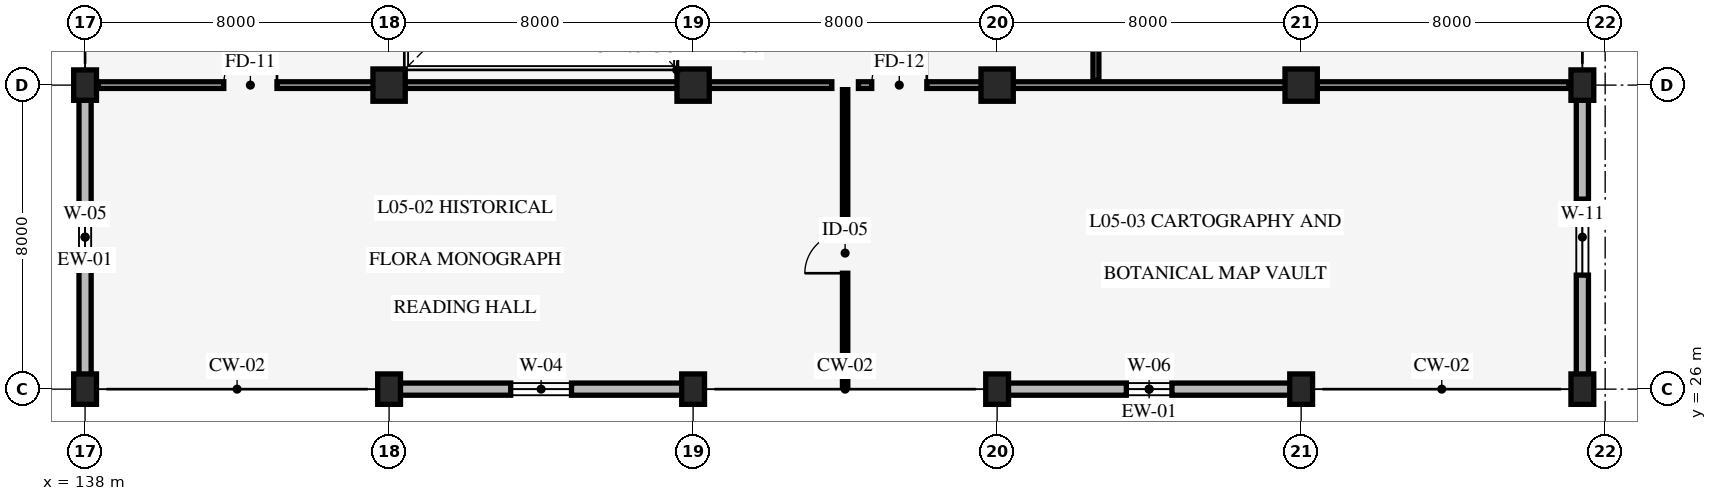
"""IFC4 building model, lengths in metres.
Left out: names, types, materials, properties, quantities, classifications, styles, units other than length and angle.
Written with IfcOpenShell. Run it as: python <this file> out.ifc"""

import sys

from ifc_helpers import new_model, si_unit, direction, frame, frame_2d, origin, origin_2d, place, context, subcontext, project, spatial, rectangle, extrude, element, fill, save


model = new_model("IFC4")
c1 = context("Model", 3, precision=1e-05, world=origin(), true_north=direction((0.0, 1.0)))
c2 = subcontext(c1, "Body", "Model", "MODEL_VIEW")
j1 = project(units=[si_unit("LENGTHUNIT", "METRE"), si_unit("PLANEANGLEUNIT", "RADIAN")], contexts=[c1])
p1 = place(None, origin())
s1 = spatial("IfcSite", under=j1, at=p1, CompositionType="ELEMENT")
p2 = place(p1, origin())
s2 = spatial("IfcBuilding", under=s1, at=p2, CompositionType="ELEMENT")
p3 = place(p2, frame((0.0, 0.0, 19.2)))
s3 = spatial("IfcBuildingStorey", under=s2, at=p3, CompositionType="ELEMENT", Elevation=19.2)
for number, where, z_axis, x_axis in (
    (1, (138.0, 26.0, 0.0), (0.0, 0.0, 1.0), (1.0, 0.0, 0.0)),
    (2, (138.0, 34.0, 0.0), (0.0, 0.0, 1.0), (1.0, 0.0, 0.0)),
    (3, (146.0, 26.0, 0.0), (0.0, 0.0, 1.0), (1.0, 0.0, 0.0)),
):
    element("IfcColumn", number, at=place(p3, frame(where, z_axis=z_axis, x_axis=x_axis)), inside=s3, PredefinedType="COLUMN", context=c2, shape_type="SweptSolid", body=[
        extrude(rectangle(XDim=0.6, YDim=0.8, at=origin_2d()), origin(), (0.0, 0.0, 1.0), 4.2),
    ])
p4 = place(p3, frame((146.0, 34.0, 0.0), z_axis=(0.0, 0.0, 1.0), x_axis=(1.0, 0.0, 0.0)))
e4 = element("IfcColumn", 4, at=p4, inside=s3, PredefinedType="COLUMN", context=c2, shape_type="SweptSolid", body=[
    extrude(rectangle(XDim=0.85, YDim=0.85, at=origin_2d()), origin(), (0.0, 0.0, 1.0), 4.2),
])
p5 = place(p3, frame((154.0, 26.0, 0.0), z_axis=(0.0, 0.0, 1.0), x_axis=(1.0, 0.0, 0.0)))
e5 = element("IfcColumn", 5, at=p5, inside=s3, PredefinedType="COLUMN", context=c2, shape_type="SweptSolid", body=[
    extrude(rectangle(XDim=0.6, YDim=0.8, at=origin_2d()), origin(), (0.0, 0.0, 1.0), 4.2),
])
p6 = place(p3, frame((154.0, 34.0, 0.0), z_axis=(0.0, 0.0, 1.0), x_axis=(1.0, 0.0, 0.0)))
e6 = element("IfcColumn", 6, at=p6, inside=s3, PredefinedType="COLUMN", context=c2, shape_type="SweptSolid", body=[
    extrude(rectangle(XDim=0.85, YDim=0.85, at=origin_2d()), origin(), (0.0, 0.0, 1.0), 4.2),
])
p7 = place(p3, frame((162.0, 26.0, 0.0), z_axis=(0.0, 0.0, 1.0), x_axis=(1.0, 0.0, 0.0)))
e7 = element("IfcColumn", 7, at=p7, inside=s3, PredefinedType="COLUMN", context=c2, shape_type="SweptSolid", body=[
    extrude(rectangle(XDim=0.6, YDim=0.8, at=origin_2d()), origin(), (0.0, 0.0, 1.0), 4.2),
])
p8 = place(p3, frame((162.0, 34.0, 0.0), z_axis=(0.0, 0.0, 1.0), x_axis=(1.0, 0.0, 0.0)))
e8 = element("IfcColumn", 8, at=p8, inside=s3, PredefinedType="COLUMN", context=c2, shape_type="SweptSolid", body=[
    extrude(rectangle(XDim=0.85, YDim=0.85, at=origin_2d()), origin(), (0.0, 0.0, 1.0), 4.2),
])
p9 = place(p3, frame((170.0, 26.0, 0.0), z_axis=(0.0, 0.0, 1.0), x_axis=(1.0, 0.0, 0.0)))
e9 = element("IfcColumn", 9, at=p9, inside=s3, PredefinedType="COLUMN", context=c2, shape_type="SweptSolid", body=[
    extrude(rectangle(XDim=0.6, YDim=0.8, at=origin_2d()), origin(), (0.0, 0.0, 1.0), 4.2),
])
p10 = place(p3, frame((170.0, 34.0, 0.0), z_axis=(0.0, 0.0, 1.0), x_axis=(1.0, 0.0, 0.0)))
e10 = element("IfcColumn", 10, at=p10, inside=s3, PredefinedType="COLUMN", context=c2, shape_type="SweptSolid", body=[
    extrude(rectangle(XDim=0.85, YDim=0.85, at=origin_2d()), origin(), (0.0, 0.0, 1.0), 4.2),
])
for number, where, z_axis, x_axis in (
    (11, (177.4, 26.0, 0.0), (0.0, 0.0, 1.0), (1.0, 0.0, 0.0)),
    (12, (177.4, 34.0, 0.0), (0.0, 0.0, 1.0), (1.0, 0.0, 0.0)),
):
    element("IfcColumn", number, at=place(p3, frame(where, z_axis=z_axis, x_axis=x_axis)), inside=s3, PredefinedType="COLUMN", context=c2, shape_type="SweptSolid", body=[
        extrude(rectangle(XDim=0.6, YDim=0.8, at=origin_2d()), origin(), (0.0, 0.0, 1.0), 4.2),
    ])
p11 = place(p3, frame((170.0, 26.0, 0.0), z_axis=(0.0, 0.0, 1.0), x_axis=(-1.0, 0.0, 0.0)))
e13 = element("IfcWall", 13, at=p11, inside=s3, PredefinedType="STANDARD", context=c2, shape_type="SweptSolid", body=[
    extrude(rectangle(XDim=8.0, YDim=0.32, at=frame_2d((4.0, 0.0))), origin(), (0.0, 0.0, 1.0), 3.14),
])
p12 = place(p11, frame((3.4, 0.0, 0.85)))
e14 = element("IfcOpeningElement", 14, at=p12, cuts=e13, PredefinedType="OPENING", context=c2, shape_type="SweptSolid", body=[
    extrude(rectangle(XDim=1.2, YDim=1.2, at=frame_2d((0.6, 0.6))), frame((0.0, 0.17, 0.0), z_axis=(0.0, -1.0, 0.0), x_axis=(1.0, 0.0, 0.0)), (0.0, 0.0, 1.0), 0.34),
])
p13 = place(p3, frame((154.0, 26.0, 0.0), z_axis=(0.0, 0.0, 1.0), x_axis=(-1.0, 0.0, 0.0)))
e15 = element("IfcWall", 15, at=p13, inside=s3, PredefinedType="STANDARD", context=c2, shape_type="SweptSolid", body=[
    extrude(rectangle(XDim=8.0, YDim=0.32, at=frame_2d((4.0, 0.0))), origin(), (0.0, 0.0, 1.0), 3.14),
])
p14 = place(p13, frame((3.2, 0.0, 0.85)))
e16 = element("IfcOpeningElement", 16, at=p14, cuts=e15, PredefinedType="OPENING", context=c2, shape_type="SweptSolid", body=[
    extrude(rectangle(XDim=1.6, YDim=1.2, at=frame_2d((0.8, 0.6))), frame((0.0, 0.17, 0.0), z_axis=(0.0, -1.0, 0.0), x_axis=(1.0, 0.0, 0.0)), (0.0, 0.0, 1.0), 0.34),
])
p15 = place(p3, frame((138.0, 26.0, 0.0), z_axis=(0.0, 0.0, 1.0), x_axis=(0.0, 1.0, 0.0)))
e17 = element("IfcWall", 17, at=p15, inside=s3, PredefinedType="STANDARD", context=c2, shape_type="SweptSolid", body=[
    extrude(rectangle(XDim=8.0, YDim=0.32, at=frame_2d((4.0, 0.0))), origin(), (0.0, 0.0, 1.0), 3.19),
])
p16 = place(p15, frame((3.25, 0.0, 0.85)))
e18 = element("IfcOpeningElement", 18, at=p16, cuts=e17, PredefinedType="OPENING", context=c2, shape_type="SweptSolid", body=[
    extrude(rectangle(XDim=1.5, YDim=1.5, at=frame_2d((0.75, 0.75))), frame((0.0, 0.17, 0.0), z_axis=(0.0, -1.0, 0.0), x_axis=(1.0, 0.0, 0.0)), (0.0, 0.0, 1.0), 0.34),
])
p17 = place(p3, frame((177.4, 34.0, 0.0), z_axis=(0.0, 0.0, 1.0), x_axis=(0.0, -1.0, 0.0)))
e19 = element("IfcWall", 19, at=p17, inside=s3, PredefinedType="STANDARD", context=c2, shape_type="SweptSolid", body=[
    extrude(rectangle(XDim=8.0, YDim=0.32, at=frame_2d((4.0, 0.0))), origin(), (0.0, 0.0, 1.0), 3.19),
])
p18 = place(p17, frame((3.0, 0.0, 0.85)))
e20 = element("IfcOpeningElement", 20, at=p18, cuts=e19, PredefinedType="OPENING", context=c2, shape_type="SweptSolid", body=[
    extrude(rectangle(XDim=2.0, YDim=1.5, at=frame_2d((1.0, 0.75))), frame((0.0, 0.17, 0.0), z_axis=(0.0, -1.0, 0.0), x_axis=(1.0, 0.0, 0.0)), (0.0, 0.0, 1.0), 0.34),
])
p19 = place(p3, frame((164.6, 34.12, 0.0), z_axis=(0.0, 0.0, 1.0), x_axis=(0.0, 1.0, 0.0)))
e21 = element("IfcWall", 21, at=p19, inside=s3, PredefinedType="STANDARD", context=c2, shape_type="SweptSolid", body=[
    extrude(rectangle(XDim=15.8, YDim=0.155, at=frame_2d((7.9, 0.0))), origin(), (0.0, 0.0, 1.0), 3.9),
])
p20 = place(p19, frame((7.175, 0.0, 0.0)))
e22 = element("IfcOpeningElement", 22, at=p20, cuts=e21, PredefinedType="OPENING", context=c2, shape_type="SweptSolid", body=[
    extrude(rectangle(XDim=1.45, YDim=2.2, at=frame_2d((0.725, 1.1))), frame((0.0, 0.087, 0.0), z_axis=(0.0, -1.0, 0.0), x_axis=(1.0, 0.0, 0.0)), (0.0, 0.0, 1.0), 0.175),
])
p21 = place(p3, frame((138.35, 34.0, 0.0), z_axis=(0.0, 0.0, 1.0), x_axis=(1.0, 0.0, 0.0)))
e23 = element("IfcWall", 23, at=p21, inside=s3, PredefinedType="STANDARD", context=c2, shape_type="SweptSolid", body=[
    extrude(rectangle(XDim=19.3, YDim=0.175, at=frame_2d((9.65, 0.0))), origin(), (0.0, 0.0, 1.0), 3.14),
])
p22 = place(p21, frame((3.3, 0.0, 0.0)))
e24 = element("IfcOpeningElement", 24, at=p22, cuts=e23, PredefinedType="OPENING", context=c2, shape_type="SweptSolid", body=[
    extrude(rectangle(XDim=1.4, YDim=2.2, at=frame_2d((0.7, 1.1))), frame((0.0, 0.098, 0.0), z_axis=(0.0, -1.0, 0.0), x_axis=(1.0, 0.0, 0.0)), (0.0, 0.0, 1.0), 0.195),
])
p23 = place(p3, frame((158.0, 26.05, 0.0), z_axis=(0.0, 0.0, 1.0), x_axis=(0.0, 1.0, 0.0)))
e25 = element("IfcWall", 25, at=p23, inside=s3, PredefinedType="STANDARD", context=c2, shape_type="SweptSolid", body=[
    extrude(rectangle(XDim=7.83, YDim=0.14, at=frame_2d((3.915, 0.0))), origin(), (0.0, 0.0, 1.0), 3.39),
])
p24 = place(p23, frame((3.0, 0.0, 0.0)))
e26 = element("IfcOpeningElement", 26, at=p24, cuts=e25, PredefinedType="OPENING", context=c2, shape_type="SweptSolid", body=[
    extrude(rectangle(XDim=1.06, YDim=2.12, at=frame_2d((0.53, 1.06))), frame((0.0, 0.08, 0.0), z_axis=(0.0, -1.0, 0.0), x_axis=(1.0, 0.0, 0.0)), (0.0, 0.0, 1.0), 0.16),
])
p25 = place(p3, frame((158.35, 34.0, 0.0), z_axis=(0.0, 0.0, 1.0), x_axis=(1.0, 0.0, 0.0)))
e27 = element("IfcWall", 27, at=p25, inside=s3, PredefinedType="STANDARD", context=c2, shape_type="SweptSolid", body=[
    extrude(rectangle(XDim=18.7, YDim=0.175, at=frame_2d((9.35, 0.0))), origin(), (0.0, 0.0, 1.0), 3.14),
])
p26 = place(p25, frame((0.35, 0.0, 0.0)))
e28 = element("IfcOpeningElement", 28, at=p26, cuts=e27, PredefinedType="OPENING", context=c2, shape_type="SweptSolid", body=[
    extrude(rectangle(XDim=1.45, YDim=2.2, at=frame_2d((0.725, 1.1))), frame((0.0, 0.098, 0.0), z_axis=(0.0, -1.0, 0.0), x_axis=(1.0, 0.0, 0.0)), (0.0, 0.0, 1.0), 0.195),
])
p27 = place(p12, origin())
e29 = element("IfcWindow", 29, at=p27, inside=s3, PartitioningType="SINGLE_PANEL", PredefinedType="WINDOW", context=c2, shape_type="SweptSolid", body=[
    extrude(rectangle(XDim=1.2, YDim=1.2, at=frame_2d((0.6, 0.6))), frame((0.0, 0.03, 0.0), z_axis=(0.0, -1.0, 0.0), x_axis=(1.0, 0.0, 0.0)), (0.0, 0.0, 1.0), 0.06),
])
fill(e14, e29)
p28 = place(p14, origin())
e30 = element("IfcWindow", 30, at=p28, inside=s3, PartitioningType="SINGLE_PANEL", PredefinedType="WINDOW", context=c2, shape_type="SweptSolid", body=[
    extrude(rectangle(XDim=1.6, YDim=1.2, at=frame_2d((0.8, 0.6))), frame((0.0, 0.03, 0.0), z_axis=(0.0, -1.0, 0.0), x_axis=(1.0, 0.0, 0.0)), (0.0, 0.0, 1.0), 0.06),
])
fill(e16, e30)
p29 = place(p16, origin())
e31 = element("IfcWindow", 31, at=p29, inside=s3, PartitioningType="SINGLE_PANEL", PredefinedType="WINDOW", context=c2, shape_type="SweptSolid", body=[
    extrude(rectangle(XDim=1.5, YDim=1.5, at=frame_2d((0.75, 0.75))), frame((0.0, 0.03, 0.0), z_axis=(0.0, -1.0, 0.0), x_axis=(1.0, 0.0, 0.0)), (0.0, 0.0, 1.0), 0.06),
])
fill(e18, e31)
p30 = place(p18, origin())
e32 = element("IfcWindow", 32, at=p30, inside=s3, PartitioningType="SINGLE_PANEL", PredefinedType="WINDOW", context=c2, shape_type="SweptSolid", body=[
    extrude(rectangle(XDim=2.0, YDim=1.5, at=frame_2d((1.0, 0.75))), frame((0.0, 0.03, 0.0), z_axis=(0.0, -1.0, 0.0), x_axis=(1.0, 0.0, 0.0)), (0.0, 0.0, 1.0), 0.06),
])
fill(e20, e32)
p31 = place(p22, origin())
e33 = element("IfcDoor", 33, at=p31, inside=s3, OperationType="SINGLE_SWING_RIGHT", PredefinedType="DOOR", context=c2, shape_type="SweptSolid", body=[
    extrude(rectangle(XDim=1.4, YDim=2.2, at=frame_2d((0.7, 1.1))), frame((0.0, 0.025, 0.0), z_axis=(0.0, -1.0, 0.0), x_axis=(1.0, 0.0, 0.0)), (0.0, 0.0, 1.0), 0.05),
])
fill(e24, e33)
p32 = place(p24, origin())
e34 = element("IfcDoor", 34, at=p32, inside=s3, OperationType="SINGLE_SWING_LEFT", PredefinedType="DOOR", context=c2, shape_type="SweptSolid", body=[
    extrude(rectangle(XDim=1.06, YDim=2.12, at=frame_2d((0.53, 1.06))), frame((0.0, 0.025, 0.0), z_axis=(0.0, -1.0, 0.0), x_axis=(1.0, 0.0, 0.0)), (0.0, 0.0, 1.0), 0.05),
])
fill(e26, e34)
p33 = place(p26, origin())
e35 = element("IfcDoor", 35, at=p33, inside=s3, OperationType="SINGLE_SWING_RIGHT", PredefinedType="DOOR", context=c2, shape_type="SweptSolid", body=[
    extrude(rectangle(XDim=1.45, YDim=2.2, at=frame_2d((0.725, 1.1))), frame((0.0, 0.025, 0.0), z_axis=(0.0, -1.0, 0.0), x_axis=(1.0, 0.0, 0.0)), (0.0, 0.0, 1.0), 0.05),
])
fill(e28, e35)
save(model, sys.argv[1])
